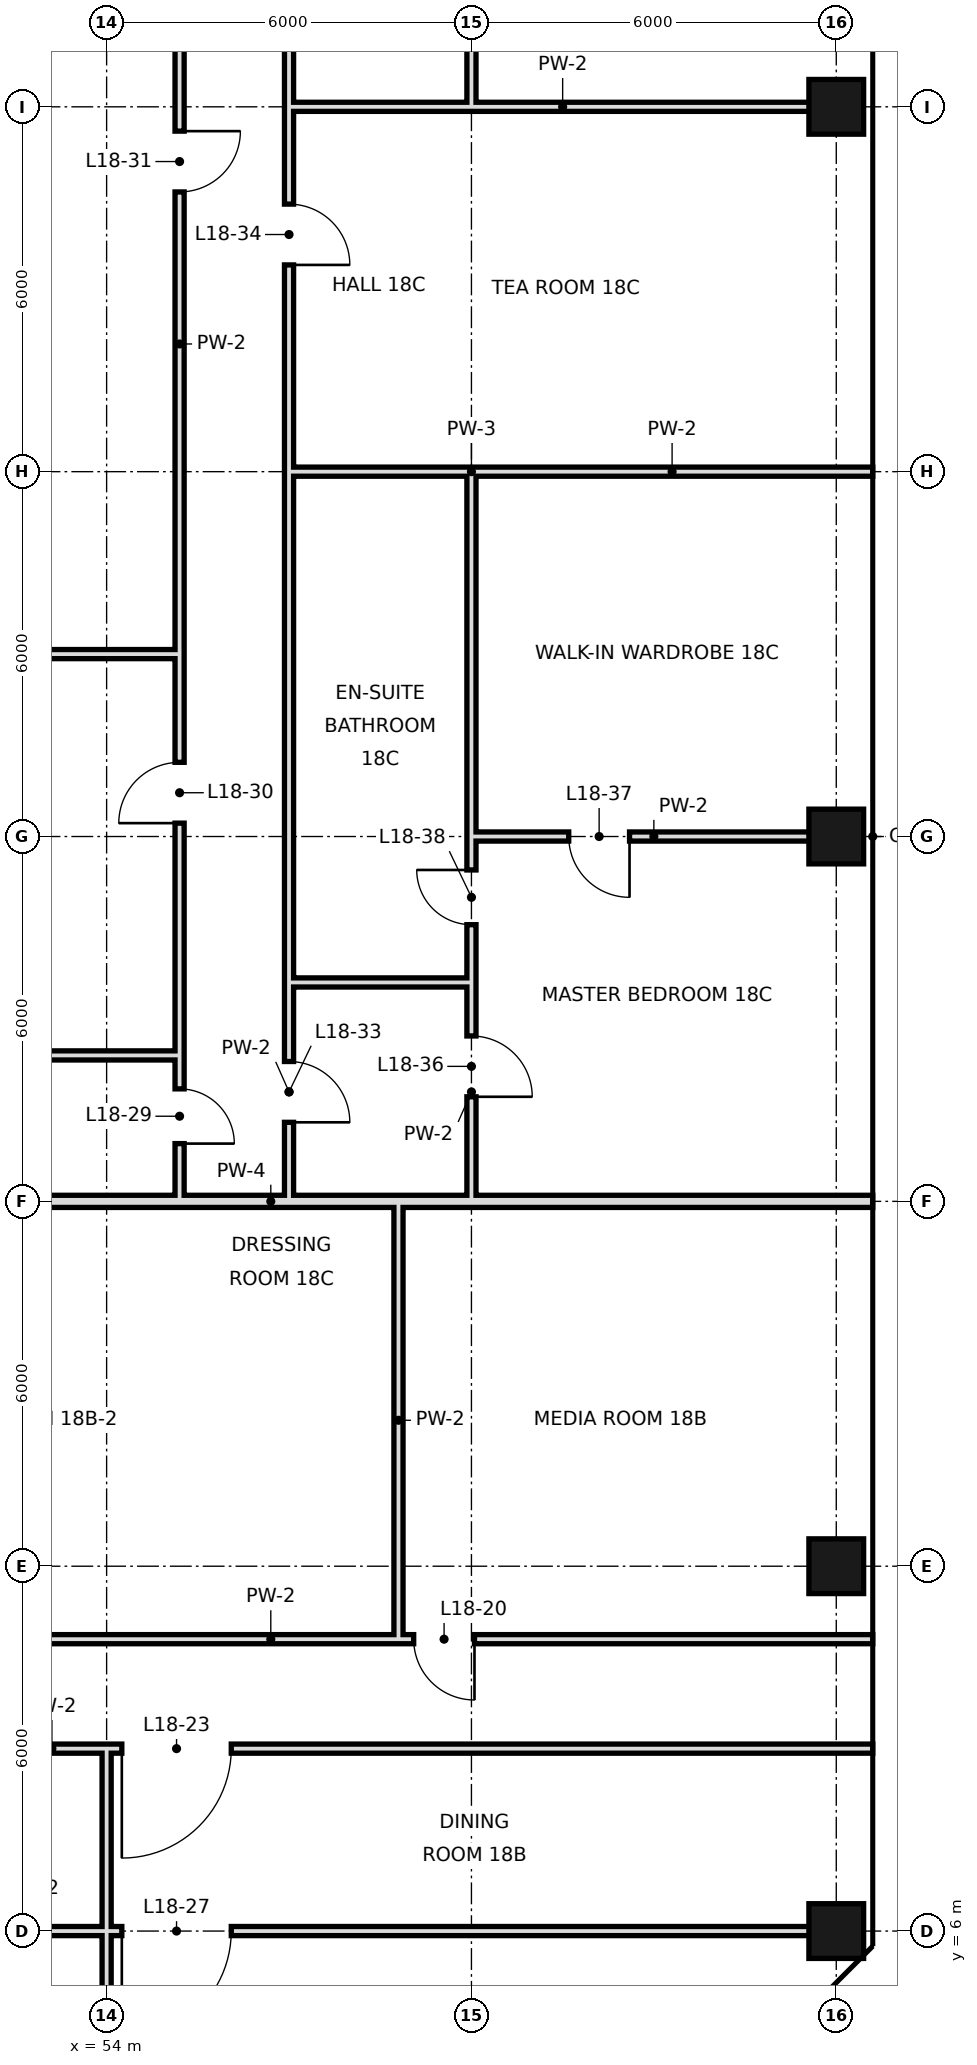
"""IFC4 building model, lengths in metres.
Left out: names, types, materials, properties, quantities, classifications, styles, units other than length and angle.
Written with IfcOpenShell. Run it as: python <this file> out.ifc"""

import sys

from ifc_helpers import new_model, si_unit, direction, frame, frame_2d, origin, origin_2d, place, context, subcontext, project, spatial, rectangle, hollow_rectangle, extrude, element, fill, save


model = new_model("IFC4")
c1 = context("Model", 3, precision=1e-05, world=origin(), true_north=direction((0.0, 1.0)))
c2 = subcontext(c1, "Body", "Model", "MODEL_VIEW")
j1 = project(units=[si_unit("LENGTHUNIT", "METRE"), si_unit("PLANEANGLEUNIT", "RADIAN")], contexts=[c1])
p1 = place(None, origin())
s1 = spatial("IfcSite", under=j1, at=p1, CompositionType="ELEMENT")
p2 = place(p1, origin())
s2 = spatial("IfcBuilding", under=s1, at=p2, CompositionType="ELEMENT")
p3 = place(p2, frame((0.0, 0.0, 85.8)))
s3 = spatial("IfcBuildingStorey", under=s2, at=p3, CompositionType="ELEMENT", Elevation=85.8)
for number, where, z_axis, x_axis in (
    (1, (66.0, 6.0, 0.0), (0.0, 0.0, 1.0), (1.0, 0.0, 0.0)),
    (2, (66.0, 12.0, 0.0), (0.0, 0.0, 1.0), (1.0, 0.0, 0.0)),
    (3, (66.0, 24.0, 0.0), (0.0, 0.0, 1.0), (1.0, 0.0, 0.0)),
    (4, (66.0, 36.0, 0.0), (0.0, 0.0, 1.0), (1.0, 0.0, 0.0)),
):
    element("IfcColumn", number, at=place(p3, frame(where, z_axis=z_axis, x_axis=x_axis)), inside=s3, PredefinedType="COLUMN", context=c2, shape_type="SweptSolid", body=[
        extrude(hollow_rectangle(XDim=0.9, YDim=0.9, WallThickness=0.045, at=origin_2d()), origin(), (0.0, 0.0, 1.0), 4.4),
    ])
p4 = place(p3, frame((54.0, -0.6, 0.0), z_axis=(0.0, 0.0, 1.0), x_axis=(0.0, 1.0, 0.0)))
e5 = element("IfcWall", 5, at=p4, inside=s3, PredefinedType="PARTITIONING", context=c2, shape_type="SweptSolid", body=[
    extrude(rectangle(XDim=9.6, YDim=0.15, at=frame_2d((4.8, 0.0))), origin(), (0.0, 0.0, 1.0), 4.1),
])
p5 = place(p3, frame((55.2, 20.4, 0.0), z_axis=(0.0, 0.0, 1.0), x_axis=(0.0, 1.0, 0.0)))
e6 = element("IfcWall", 6, at=p5, inside=s3, PredefinedType="PARTITIONING", context=c2, shape_type="SweptSolid", body=[
    extrude(rectangle(XDim=23.4, YDim=0.15, at=frame_2d((11.7, 0.0))), origin(), (0.0, 0.0, 1.0), 4.1),
])
p6 = place(p5, frame((19.84, 0.0, 0.0)))
e7 = element("IfcOpeningElement", 7, at=p6, cuts=e6, PredefinedType="OPENING", context=c2, shape_type="SweptSolid", body=[
    extrude(rectangle(XDim=1.0, YDim=2.4, at=frame_2d((0.5, 1.2))), frame((0.0, 0.085, 0.0), z_axis=(0.0, -1.0, 0.0), x_axis=(1.0, 0.0, 0.0)), (0.0, 0.0, 1.0), 0.17),
])
p7 = place(p5, frame((3.82, 0.0, 0.0)))
e8 = element("IfcOpeningElement", 8, at=p7, cuts=e6, PredefinedType="OPENING", context=c2, shape_type="SweptSolid", body=[
    extrude(rectangle(XDim=1.0, YDim=2.4, at=frame_2d((0.5, 1.2))), frame((0.0, 0.085, 0.0), z_axis=(0.0, -1.0, 0.0), x_axis=(1.0, 0.0, 0.0)), (0.0, 0.0, 1.0), 0.17),
])
p8 = place(p5, frame((14.2, 0.0, 0.0)))
e9 = element("IfcOpeningElement", 9, at=p8, cuts=e6, PredefinedType="OPENING", context=c2, shape_type="SweptSolid", body=[
    extrude(rectangle(XDim=1.0, YDim=2.4, at=frame_2d((0.5, 1.2))), frame((0.0, 0.085, 0.0), z_axis=(0.0, -1.0, 0.0), x_axis=(1.0, 0.0, 0.0)), (0.0, 0.0, 1.0), 0.17),
])
p9 = place(p3, frame((55.2, 18.0, 0.0), z_axis=(0.0, 0.0, 1.0), x_axis=(0.0, 1.0, 0.0)))
e10 = element("IfcWall", 10, at=p9, inside=s3, PredefinedType="PARTITIONING", context=c2, shape_type="SweptSolid", body=[
    extrude(rectangle(XDim=2.4, YDim=0.15, at=frame_2d((1.2, 0.0))), origin(), (0.0, 0.0, 1.0), 4.1),
])
p10 = place(p9, frame((0.95, 0.0, 0.0)))
e11 = element("IfcOpeningElement", 11, at=p10, cuts=e10, PredefinedType="OPENING", context=c2, shape_type="SweptSolid", body=[
    extrude(rectangle(XDim=0.9, YDim=2.4, at=frame_2d((0.45, 1.2))), frame((0.0, 0.085, 0.0), z_axis=(0.0, -1.0, 0.0), x_axis=(1.0, 0.0, 0.0)), (0.0, 0.0, 1.0), 0.17),
])
p11 = place(p3, frame((57.0, 18.0, 0.0), z_axis=(0.0, 0.0, 1.0), x_axis=(0.0, 1.0, 0.0)))
e12 = element("IfcWall", 12, at=p11, inside=s3, PredefinedType="PARTITIONING", context=c2, shape_type="SweptSolid", body=[
    extrude(rectangle(XDim=3.6, YDim=0.15, at=frame_2d((1.8, 0.0))), origin(), (0.0, 0.0, 1.0), 4.1),
])
p12 = place(p11, frame((1.3, 0.0, 0.0)))
e13 = element("IfcOpeningElement", 13, at=p12, cuts=e12, PredefinedType="OPENING", context=c2, shape_type="SweptSolid", body=[
    extrude(rectangle(XDim=1.0, YDim=2.4, at=frame_2d((0.5, 1.2))), frame((0.0, 0.085, 0.0), z_axis=(0.0, -1.0, 0.0), x_axis=(1.0, 0.0, 0.0)), (0.0, 0.0, 1.0), 0.17),
])
p13 = place(p3, frame((57.0, 30.0, 0.0), z_axis=(0.0, 0.0, 1.0), x_axis=(0.0, 1.0, 0.0)))
e14 = element("IfcWall", 14, at=p13, inside=s3, PredefinedType="PARTITIONING", context=c2, shape_type="SweptSolid", body=[
    extrude(rectangle(XDim=18.6, YDim=0.15, at=frame_2d((9.3, 0.0))), origin(), (0.0, 0.0, 1.0), 4.1),
])
p14 = place(p13, frame((3.4, 0.0, 0.0)))
e15 = element("IfcOpeningElement", 15, at=p14, cuts=e14, PredefinedType="OPENING", context=c2, shape_type="SweptSolid", body=[
    extrude(rectangle(XDim=1.0, YDim=2.4, at=frame_2d((0.5, 1.2))), frame((0.0, 0.085, 0.0), z_axis=(0.0, -1.0, 0.0), x_axis=(1.0, 0.0, 0.0)), (0.0, 0.0, 1.0), 0.17),
])
p15 = place(p13, frame((9.16, 0.0, 0.0)))
e16 = element("IfcOpeningElement", 16, at=p15, cuts=e14, PredefinedType="OPENING", context=c2, shape_type="SweptSolid", body=[
    extrude(rectangle(XDim=1.8, YDim=2.4, at=frame_2d((0.9, 1.2))), frame((0.0, 0.085, 0.0), z_axis=(0.0, -1.0, 0.0), x_axis=(1.0, 0.0, 0.0)), (0.0, 0.0, 1.0), 0.17),
])
p16 = place(p3, frame((57.0, 21.6, 0.0), z_axis=(0.0, 0.0, 1.0), x_axis=(0.0, 1.0, 0.0)))
e17 = element("IfcWall", 17, at=p16, inside=s3, PredefinedType="PARTITIONING", context=c2, shape_type="SweptSolid", body=[
    extrude(rectangle(XDim=8.4, YDim=0.15, at=frame_2d((4.2, 0.0))), origin(), (0.0, 0.0, 1.0), 4.1),
])
p17 = place(p3, frame((58.8, 10.8, 0.0), z_axis=(0.0, 0.0, 1.0), x_axis=(0.0, 1.0, 0.0)))
e18 = element("IfcWall", 18, at=p17, inside=s3, PredefinedType="PARTITIONING", context=c2, shape_type="SweptSolid", body=[
    extrude(rectangle(XDim=7.2, YDim=0.15, at=frame_2d((3.6, 0.0))), origin(), (0.0, 0.0, 1.0), 4.1),
])
p18 = place(p3, frame((60.0, 18.0, 0.0), z_axis=(0.0, 0.0, 1.0), x_axis=(0.0, 1.0, 0.0)))
e19 = element("IfcWall", 19, at=p18, inside=s3, PredefinedType="PARTITIONING", context=c2, shape_type="SweptSolid", body=[
    extrude(rectangle(XDim=3.6, YDim=0.15, at=frame_2d((1.8, 0.0))), origin(), (0.0, 0.0, 1.0), 4.1),
])
p19 = place(p18, frame((1.72, 0.0, 0.0)))
e20 = element("IfcOpeningElement", 20, at=p19, cuts=e19, PredefinedType="OPENING", context=c2, shape_type="SweptSolid", body=[
    extrude(rectangle(XDim=1.0, YDim=2.4, at=frame_2d((0.5, 1.2))), frame((0.0, 0.085, 0.0), z_axis=(0.0, -1.0, 0.0), x_axis=(1.0, 0.0, 0.0)), (0.0, 0.0, 1.0), 0.17),
])
p20 = place(p3, frame((60.0, 36.0, 0.0), z_axis=(0.0, 0.0, 1.0), x_axis=(0.0, 1.0, 0.0)))
e21 = element("IfcWall", 21, at=p20, inside=s3, PredefinedType="PARTITIONING", context=c2, shape_type="SweptSolid", body=[
    extrude(rectangle(XDim=12.0, YDim=0.15, at=frame_2d((6.0, 0.0))), origin(), (0.0, 0.0, 1.0), 4.1),
])
p21 = place(p20, frame((7.04, 0.0, 0.0)))
e22 = element("IfcOpeningElement", 22, at=p21, cuts=e21, PredefinedType="OPENING", context=c2, shape_type="SweptSolid", body=[
    extrude(rectangle(XDim=1.8, YDim=2.4, at=frame_2d((0.9, 1.2))), frame((0.0, 0.085, 0.0), z_axis=(0.0, -1.0, 0.0), x_axis=(1.0, 0.0, 0.0)), (0.0, 0.0, 1.0), 0.17),
])
p22 = place(p3, frame((60.0, 21.6, 0.0), z_axis=(0.0, 0.0, 1.0), x_axis=(0.0, 1.0, 0.0)))
e23 = element("IfcWall", 23, at=p22, inside=s3, PredefinedType="PARTITIONING", context=c2, shape_type="SweptSolid", body=[
    extrude(rectangle(XDim=8.4, YDim=0.15, at=frame_2d((4.2, 0.0))), origin(), (0.0, 0.0, 1.0), 4.1),
])
p23 = place(p22, frame((0.95, 0.0, 0.0)))
e24 = element("IfcOpeningElement", 24, at=p23, cuts=e23, PredefinedType="OPENING", context=c2, shape_type="SweptSolid", body=[
    extrude(rectangle(XDim=0.9, YDim=2.4, at=frame_2d((0.45, 1.2))), frame((0.0, 0.085, 0.0), z_axis=(0.0, -1.0, 0.0), x_axis=(1.0, 0.0, 0.0)), (0.0, 0.0, 1.0), 0.17),
])
p24 = place(p3, frame((46.8, 10.8, 0.0), z_axis=(0.0, 0.0, 1.0), x_axis=(1.0, 0.0, 0.0)))
e25 = element("IfcWall", 25, at=p24, inside=s3, PredefinedType="PARTITIONING", context=c2, shape_type="SweptSolid", body=[
    extrude(rectangle(XDim=19.8, YDim=0.15, at=frame_2d((9.9, 0.0))), origin(), (0.0, 0.0, 1.0), 4.1),
])
p25 = place(p24, frame((3.4, 0.0, 0.0)))
e26 = element("IfcOpeningElement", 26, at=p25, cuts=e25, PredefinedType="OPENING", context=c2, shape_type="SweptSolid", body=[
    extrude(rectangle(XDim=1.0, YDim=2.4, at=frame_2d((0.5, 1.2))), frame((0.0, 0.085, 0.0), z_axis=(0.0, -1.0, 0.0), x_axis=(1.0, 0.0, 0.0)), (0.0, 0.0, 1.0), 0.17),
])
p26 = place(p24, frame((12.25, 0.0, 0.0)))
e27 = element("IfcOpeningElement", 27, at=p26, cuts=e25, PredefinedType="OPENING", context=c2, shape_type="SweptSolid", body=[
    extrude(rectangle(XDim=1.0, YDim=2.4, at=frame_2d((0.5, 1.2))), frame((0.0, 0.085, 0.0), z_axis=(0.0, -1.0, 0.0), x_axis=(1.0, 0.0, 0.0)), (0.0, 0.0, 1.0), 0.17),
])
p27 = place(p3, frame((46.8, 18.0, 0.0), z_axis=(0.0, 0.0, 1.0), x_axis=(1.0, 0.0, 0.0)))
e28 = element("IfcWall", 28, at=p27, inside=s3, PredefinedType="SOLIDWALL", context=c2, shape_type="SweptSolid", body=[
    extrude(rectangle(XDim=19.8, YDim=0.2, at=frame_2d((9.9, 0.0))), origin(), (0.0, 0.0, 1.0), 3.2),
])
p28 = place(p3, frame((44.9, 20.4, 0.0), z_axis=(0.0, 0.0, 1.0), x_axis=(1.0, 0.0, 0.0)))
e29 = element("IfcWall", 29, at=p28, inside=s3, PredefinedType="PARTITIONING", context=c2, shape_type="SweptSolid", body=[
    extrude(rectangle(XDim=10.3, YDim=0.15, at=frame_2d((5.15, 0.0))), origin(), (0.0, 0.0, 1.0), 4.1),
])
p29 = place(p3, frame((57.0, 21.6, 0.0), z_axis=(0.0, 0.0, 1.0), x_axis=(1.0, 0.0, 0.0)))
e30 = element("IfcWall", 30, at=p29, inside=s3, PredefinedType="PARTITIONING", context=c2, shape_type="SweptSolid", body=[
    extrude(rectangle(XDim=3.0, YDim=0.15, at=frame_2d((1.5, 0.0))), origin(), (0.0, 0.0, 1.0), 4.1),
])
p30 = place(p3, frame((60.0, 24.0, 0.0), z_axis=(0.0, 0.0, 1.0), x_axis=(1.0, 0.0, 0.0)))
e31 = element("IfcWall", 31, at=p30, inside=s3, PredefinedType="PARTITIONING", context=c2, shape_type="SweptSolid", body=[
    extrude(rectangle(XDim=6.0, YDim=0.15, at=frame_2d((3.0, 0.0))), origin(), (0.0, 0.0, 1.0), 3.2),
])
p31 = place(p30, frame((1.6, 0.0, 0.0)))
e32 = element("IfcOpeningElement", 32, at=p31, cuts=e31, PredefinedType="OPENING", context=c2, shape_type="SweptSolid", body=[
    extrude(rectangle(XDim=1.0, YDim=2.4, at=frame_2d((0.5, 1.2))), frame((0.0, 0.085, 0.0), z_axis=(0.0, -1.0, 0.0), x_axis=(1.0, 0.0, 0.0)), (0.0, 0.0, 1.0), 0.17),
])
p32 = place(p3, frame((44.9, 27.0, 0.0), z_axis=(0.0, 0.0, 1.0), x_axis=(1.0, 0.0, 0.0)))
e33 = element("IfcWall", 33, at=p32, inside=s3, PredefinedType="PARTITIONING", context=c2, shape_type="SweptSolid", body=[
    extrude(rectangle(XDim=10.3, YDim=0.15, at=frame_2d((5.15, 0.0))), origin(), (0.0, 0.0, 1.0), 4.1),
])
p33 = place(p3, frame((60.0, 30.0, 0.0), z_axis=(0.0, 0.0, 1.0), x_axis=(1.0, 0.0, 0.0)))
e34 = element("IfcWall", 34, at=p33, inside=s3, PredefinedType="PARTITIONING", context=c2, shape_type="SweptSolid", body=[
    extrude(rectangle(XDim=6.6, YDim=0.15, at=frame_2d((3.3, 0.0))), origin(), (0.0, 0.0, 1.0), 3.2),
])
p34 = place(p3, frame((57.0, 30.0, 0.0), z_axis=(0.0, 0.0, 1.0), x_axis=(1.0, 0.0, 0.0)))
e35 = element("IfcWall", 35, at=p34, inside=s3, PredefinedType="PARTITIONING", context=c2, shape_type="SweptSolid", body=[
    extrude(rectangle(XDim=3.0, YDim=0.15, at=frame_2d((1.5, 0.0))), origin(), (0.0, 0.0, 1.0), 3.2),
])
p35 = place(p3, frame((57.0, 36.0, 0.0), z_axis=(0.0, 0.0, 1.0), x_axis=(1.0, 0.0, 0.0)))
e36 = element("IfcWall", 36, at=p35, inside=s3, PredefinedType="PARTITIONING", context=c2, shape_type="SweptSolid", body=[
    extrude(rectangle(XDim=9.0, YDim=0.15, at=frame_2d((4.5, 0.0))), origin(), (0.0, 0.0, 1.0), 3.2),
])
p36 = place(p3, frame((39.6, 6.0, 0.0), z_axis=(0.0, 0.0, 1.0), x_axis=(1.0, 0.0, 0.0)))
e37 = element("IfcWall", 37, at=p36, inside=s3, PredefinedType="PARTITIONING", context=c2, shape_type="SweptSolid", body=[
    extrude(rectangle(XDim=26.4, YDim=0.15, at=frame_2d((13.2, 0.0))), origin(), (0.0, 0.0, 1.0), 3.2),
])
p37 = place(p36, frame((0.52, 0.0, 0.0)))
e38 = element("IfcOpeningElement", 38, at=p37, cuts=e37, PredefinedType="OPENING", context=c2, shape_type="SweptSolid", body=[
    extrude(rectangle(XDim=1.0, YDim=2.4, at=frame_2d((0.5, 1.2))), frame((0.0, 0.085, 0.0), z_axis=(0.0, -1.0, 0.0), x_axis=(1.0, 0.0, 0.0)), (0.0, 0.0, 1.0), 0.17),
])
p38 = place(p36, frame((10.0, 0.0, 0.0)))
e39 = element("IfcOpeningElement", 39, at=p38, cuts=e37, PredefinedType="OPENING", context=c2, shape_type="SweptSolid", body=[
    extrude(rectangle(XDim=1.0, YDim=2.4, at=frame_2d((0.5, 1.2))), frame((0.0, 0.085, 0.0), z_axis=(0.0, -1.0, 0.0), x_axis=(1.0, 0.0, 0.0)), (0.0, 0.0, 1.0), 0.17),
])
p39 = place(p36, frame((14.65, 0.0, 0.0)))
e40 = element("IfcOpeningElement", 40, at=p39, cuts=e37, PredefinedType="OPENING", context=c2, shape_type="SweptSolid", body=[
    extrude(rectangle(XDim=1.8, YDim=2.4, at=frame_2d((0.9, 1.2))), frame((0.0, 0.085, 0.0), z_axis=(0.0, -1.0, 0.0), x_axis=(1.0, 0.0, 0.0)), (0.0, 0.0, 1.0), 0.17),
])
p40 = place(p3, frame((39.6, 9.0, 0.0), z_axis=(0.0, 0.0, 1.0), x_axis=(1.0, 0.0, 0.0)))
e41 = element("IfcWall", 41, at=p40, inside=s3, PredefinedType="PARTITIONING", context=c2, shape_type="SweptSolid", body=[
    extrude(rectangle(XDim=27.0, YDim=0.15, at=frame_2d((13.5, 0.0))), origin(), (0.0, 0.0, 1.0), 4.1),
])
p41 = place(p40, frame((0.7, 0.0, 0.0)))
e42 = element("IfcOpeningElement", 42, at=p41, cuts=e41, PredefinedType="OPENING", context=c2, shape_type="SweptSolid", body=[
    extrude(rectangle(XDim=1.0, YDim=2.4, at=frame_2d((0.5, 1.2))), frame((0.0, 0.085, 0.0), z_axis=(0.0, -1.0, 0.0), x_axis=(1.0, 0.0, 0.0)), (0.0, 0.0, 1.0), 0.17),
])
p42 = place(p40, frame((7.9, 0.0, 0.0)))
e43 = element("IfcOpeningElement", 43, at=p42, cuts=e41, PredefinedType="OPENING", context=c2, shape_type="SweptSolid", body=[
    extrude(rectangle(XDim=1.0, YDim=2.4, at=frame_2d((0.5, 1.2))), frame((0.0, 0.085, 0.0), z_axis=(0.0, -1.0, 0.0), x_axis=(1.0, 0.0, 0.0)), (0.0, 0.0, 1.0), 0.17),
])
p43 = place(p40, frame((14.65, 0.0, 0.0)))
e44 = element("IfcOpeningElement", 44, at=p43, cuts=e41, PredefinedType="OPENING", context=c2, shape_type="SweptSolid", body=[
    extrude(rectangle(XDim=1.8, YDim=2.4, at=frame_2d((0.9, 1.2))), frame((0.0, 0.085, 0.0), z_axis=(0.0, -1.0, 0.0), x_axis=(1.0, 0.0, 0.0)), (0.0, 0.0, 1.0), 0.17),
])
p44 = place(p26, origin())
e45 = element("IfcDoor", 45, at=p44, inside=s3, OperationType="SINGLE_SWING_RIGHT", PredefinedType="DOOR", context=c2, shape_type="SweptSolid", body=[
    extrude(rectangle(XDim=1.0, YDim=2.4, at=frame_2d((0.5, 1.2))), frame((0.0, 0.025, 0.0), z_axis=(0.0, -1.0, 0.0), x_axis=(1.0, 0.0, 0.0)), (0.0, 0.0, 1.0), 0.05),
])
fill(e27, e45)
p45 = place(p43, frame((1.8, 0.0, 0.0), z_axis=(0.0, 0.0, 1.0), x_axis=(-1.0, 0.0, 0.0)))
e46 = element("IfcDoor", 46, at=p45, inside=s3, OperationType="SINGLE_SWING_RIGHT", PredefinedType="DOOR", context=c2, shape_type="SweptSolid", body=[
    extrude(rectangle(XDim=1.8, YDim=2.4, at=frame_2d((0.9, 1.2))), frame((0.0, 0.025, 0.0), z_axis=(0.0, -1.0, 0.0), x_axis=(1.0, 0.0, 0.0)), (0.0, 0.0, 1.0), 0.05),
])
fill(e44, e46)
p46 = place(p39, frame((1.8, 0.0, 0.0), z_axis=(0.0, 0.0, 1.0), x_axis=(-1.0, 0.0, 0.0)))
e47 = element("IfcDoor", 47, at=p46, inside=s3, OperationType="SINGLE_SWING_RIGHT", PredefinedType="DOOR", context=c2, shape_type="SweptSolid", body=[
    extrude(rectangle(XDim=1.8, YDim=2.4, at=frame_2d((0.9, 1.2))), frame((0.0, 0.025, 0.0), z_axis=(0.0, -1.0, 0.0), x_axis=(1.0, 0.0, 0.0)), (0.0, 0.0, 1.0), 0.05),
])
fill(e40, e47)
p47 = place(p10, frame((0.9, 0.0, 0.0), z_axis=(0.0, 0.0, 1.0), x_axis=(-1.0, 0.0, 0.0)))
e48 = element("IfcDoor", 48, at=p47, inside=s3, OperationType="SINGLE_SWING_RIGHT", PredefinedType="DOOR", context=c2, shape_type="SweptSolid", body=[
    extrude(rectangle(XDim=0.9, YDim=2.4, at=frame_2d((0.45, 1.2))), frame((0.0, 0.025, 0.0), z_axis=(0.0, -1.0, 0.0), x_axis=(1.0, 0.0, 0.0)), (0.0, 0.0, 1.0), 0.05),
])
fill(e11, e48)
p48 = place(p7, origin())
e49 = element("IfcDoor", 49, at=p48, inside=s3, OperationType="SINGLE_SWING_LEFT", PredefinedType="DOOR", context=c2, shape_type="SweptSolid", body=[
    extrude(rectangle(XDim=1.0, YDim=2.4, at=frame_2d((0.5, 1.2))), frame((0.0, 0.025, 0.0), z_axis=(0.0, -1.0, 0.0), x_axis=(1.0, 0.0, 0.0)), (0.0, 0.0, 1.0), 0.05),
])
fill(e8, e49)
p49 = place(p8, origin())
e50 = element("IfcDoor", 50, at=p49, inside=s3, OperationType="SINGLE_SWING_RIGHT", PredefinedType="DOOR", context=c2, shape_type="SweptSolid", body=[
    extrude(rectangle(XDim=1.0, YDim=2.4, at=frame_2d((0.5, 1.2))), frame((0.0, 0.025, 0.0), z_axis=(0.0, -1.0, 0.0), x_axis=(1.0, 0.0, 0.0)), (0.0, 0.0, 1.0), 0.05),
])
fill(e9, e50)
p50 = place(p12, frame((1.0, 0.0, 0.0), z_axis=(0.0, 0.0, 1.0), x_axis=(-1.0, 0.0, 0.0)))
e51 = element("IfcDoor", 51, at=p50, inside=s3, OperationType="SINGLE_SWING_RIGHT", PredefinedType="DOOR", context=c2, shape_type="SweptSolid", body=[
    extrude(rectangle(XDim=1.0, YDim=2.4, at=frame_2d((0.5, 1.2))), frame((0.0, 0.025, 0.0), z_axis=(0.0, -1.0, 0.0), x_axis=(1.0, 0.0, 0.0)), (0.0, 0.0, 1.0), 0.05),
])
fill(e13, e51)
p51 = place(p14, frame((1.0, 0.0, 0.0), z_axis=(0.0, 0.0, 1.0), x_axis=(-1.0, 0.0, 0.0)))
e52 = element("IfcDoor", 52, at=p51, inside=s3, OperationType="SINGLE_SWING_RIGHT", PredefinedType="DOOR", context=c2, shape_type="SweptSolid", body=[
    extrude(rectangle(XDim=1.0, YDim=2.4, at=frame_2d((0.5, 1.2))), frame((0.0, 0.025, 0.0), z_axis=(0.0, -1.0, 0.0), x_axis=(1.0, 0.0, 0.0)), (0.0, 0.0, 1.0), 0.05),
])
fill(e15, e52)
p52 = place(p19, frame((1.0, 0.0, 0.0), z_axis=(0.0, 0.0, 1.0), x_axis=(-1.0, 0.0, 0.0)))
e53 = element("IfcDoor", 53, at=p52, inside=s3, OperationType="SINGLE_SWING_RIGHT", PredefinedType="DOOR", context=c2, shape_type="SweptSolid", body=[
    extrude(rectangle(XDim=1.0, YDim=2.4, at=frame_2d((0.5, 1.2))), frame((0.0, 0.025, 0.0), z_axis=(0.0, -1.0, 0.0), x_axis=(1.0, 0.0, 0.0)), (0.0, 0.0, 1.0), 0.05),
])
fill(e20, e53)
p53 = place(p31, origin())
e54 = element("IfcDoor", 54, at=p53, inside=s3, OperationType="SINGLE_SWING_RIGHT", PredefinedType="DOOR", context=c2, shape_type="SweptSolid", body=[
    extrude(rectangle(XDim=1.0, YDim=2.4, at=frame_2d((0.5, 1.2))), frame((0.0, 0.025, 0.0), z_axis=(0.0, -1.0, 0.0), x_axis=(1.0, 0.0, 0.0)), (0.0, 0.0, 1.0), 0.05),
])
fill(e32, e54)
p54 = place(p23, frame((0.9, 0.0, 0.0), z_axis=(0.0, 0.0, 1.0), x_axis=(-1.0, 0.0, 0.0)))
e55 = element("IfcDoor", 55, at=p54, inside=s3, OperationType="SINGLE_SWING_LEFT", PredefinedType="DOOR", context=c2, shape_type="SweptSolid", body=[
    extrude(rectangle(XDim=0.9, YDim=2.4, at=frame_2d((0.45, 1.2))), frame((0.0, 0.025, 0.0), z_axis=(0.0, -1.0, 0.0), x_axis=(1.0, 0.0, 0.0)), (0.0, 0.0, 1.0), 0.05),
])
fill(e24, e55)
save(model, sys.argv[1])
